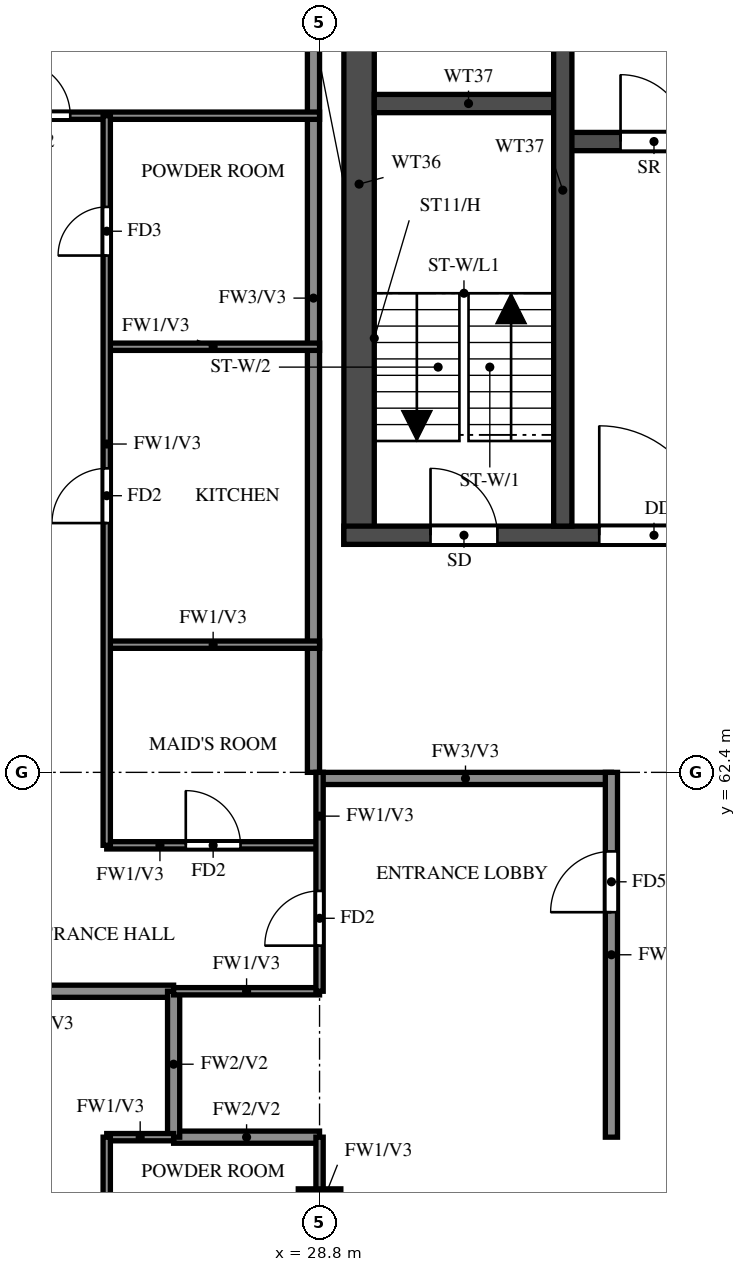
"""IFC4 building model, lengths in metres.
Left out: names, types, materials, properties, quantities, classifications, styles, units other than length and angle.
Written with IfcOpenShell. Run it as: python <this file> out.ifc"""

import sys

from ifc_helpers import new_model, si_unit, direction, frame, frame_2d, origin, origin_2d, place, context, subcontext, project, spatial, rectangle, extrude, source, transform, mapped, element, fill, save


model = new_model("IFC4")
c1 = context("Model", 3, precision=1e-05, world=origin(), true_north=direction((0.0, 1.0)))
c2 = subcontext(c1, "Body", "Model", "MODEL_VIEW")
j1 = project(units=[si_unit("LENGTHUNIT", "METRE"), si_unit("PLANEANGLEUNIT", "RADIAN")], contexts=[c1])
p1 = place(None, origin())
s1 = spatial("IfcSite", under=j1, at=p1, CompositionType="ELEMENT")
p2 = place(p1, origin())
s2 = spatial("IfcBuilding", under=s1, at=p2, CompositionType="ELEMENT")
p3 = place(p2, frame((0.0, 0.0, 260.5)))
s3 = spatial("IfcBuildingStorey", under=s2, at=p3, CompositionType="ELEMENT", Elevation=260.5)
m1 = source(origin(), c2, "Body", "SweptSolid", [
    extrude(rectangle(XDim=0.7, YDim=0.7, at=origin_2d()), origin(), (0.0, 0.0, 1.0), 3.22),
])
p4 = place(p3, frame((28.8, 55.2, 0.0), z_axis=(0.0, 0.0, 1.0), x_axis=(1.0, 0.0, 0.0)))
e1 = element("IfcColumn", 1, at=p4, inside=s3, PredefinedType="COLUMN", context=c2, shape_type="MappedRepresentation", body=[
    mapped(m1, transform((0.0, 0.0, 0.0))),
])
p5 = place(p3, frame((29.45, 66.15, 0.0), z_axis=(0.0, 0.0, 1.0), x_axis=(0.0, 1.0, 0.0)))
e2 = element("IfcWall", 2, at=p5, inside=s3, PredefinedType="SHEAR", context=c2, shape_type="SweptSolid", body=[
    extrude(rectangle(XDim=11.85, YDim=0.5, at=frame_2d((5.925, 0.0))), origin(), (0.0, 0.0, 1.0), 3.22),
])
p6 = place(p3, frame((29.2, 66.3, 0.0), z_axis=(0.0, 0.0, 1.0), x_axis=(1.0, 0.0, 0.0)))
e3 = element("IfcWall", 3, at=p6, inside=s3, PredefinedType="SHEAR", context=c2, shape_type="SweptSolid", body=[
    extrude(rectangle(XDim=42.4, YDim=0.3, at=frame_2d((21.2, 0.0))), origin(), (0.0, 0.0, 1.0), 3.22),
])
p7 = place(p6, frame((1.425, 0.0, 0.0)))
e4 = element("IfcOpeningElement", 4, at=p7, cuts=e3, PredefinedType="OPENING", context=c2, shape_type="SweptSolid", body=[
    extrude(rectangle(XDim=1.1, YDim=2.1, at=frame_2d((0.55, 1.05))), frame((0.0, 0.16, 0.0), z_axis=(0.0, -1.0, 0.0), x_axis=(1.0, 0.0, 0.0)), (0.0, 0.0, 1.0), 0.32),
])
p8 = place(p6, frame((4.2, 0.0, 0.0)))
e5 = element("IfcOpeningElement", 5, at=p8, cuts=e3, PredefinedType="OPENING", context=c2, shape_type="SweptSolid", body=[
    extrude(rectangle(XDim=1.8, YDim=2.1, at=frame_2d((0.9, 1.05))), frame((0.0, 0.16, 0.0), z_axis=(0.0, -1.0, 0.0), x_axis=(1.0, 0.0, 0.0)), (0.0, 0.0, 1.0), 0.32),
])
p9 = place(p3, frame((32.8, 72.775, 0.0), z_axis=(0.0, 0.0, 1.0), x_axis=(1.0, 0.0, 0.0)))
e6 = element("IfcWall", 6, at=p9, inside=s3, PredefinedType="SHEAR", context=c2, shape_type="SweptSolid", body=[
    extrude(rectangle(XDim=35.2, YDim=0.3, at=frame_2d((17.6, 0.0))), origin(), (0.0, 0.0, 1.0), 3.22),
])
p10 = place(p9, frame((19.8, 0.0, 0.0)))
e7 = element("IfcOpeningElement", 7, at=p10, cuts=e6, PredefinedType="OPENING", context=c2, shape_type="SweptSolid", body=[
    extrude(rectangle(XDim=1.1, YDim=2.1, at=frame_2d((0.55, 1.05))), frame((0.0, 0.16, 0.0), z_axis=(0.0, -1.0, 0.0), x_axis=(1.0, 0.0, 0.0)), (0.0, 0.0, 1.0), 0.32),
])
p11 = place(p9, frame((27.725, 0.0, 0.0)))
e8 = element("IfcOpeningElement", 8, at=p11, cuts=e6, PredefinedType="OPENING", context=c2, shape_type="SweptSolid", body=[
    extrude(rectangle(XDim=1.1, YDim=2.1, at=frame_2d((0.55, 1.05))), frame((0.0, 0.16, 0.0), z_axis=(0.0, -1.0, 0.0), x_axis=(1.0, 0.0, 0.0)), (0.0, 0.0, 1.0), 0.32),
])
p12 = place(p9, frame((30.325, 0.0, 0.0)))
e9 = element("IfcOpeningElement", 9, at=p12, cuts=e6, PredefinedType="OPENING", context=c2, shape_type="SweptSolid", body=[
    extrude(rectangle(XDim=1.1, YDim=2.1, at=frame_2d((0.55, 1.05))), frame((0.0, 0.16, 0.0), z_axis=(0.0, -1.0, 0.0), x_axis=(1.0, 0.0, 0.0)), (0.0, 0.0, 1.0), 0.32),
])
p13 = place(p9, frame((3.825, 0.0, 0.0)))
e10 = element("IfcOpeningElement", 10, at=p13, cuts=e6, PredefinedType="OPENING", context=c2, shape_type="SweptSolid", body=[
    extrude(rectangle(XDim=1.1, YDim=2.1, at=frame_2d((0.55, 1.05))), frame((0.0, 0.16, 0.0), z_axis=(0.0, -1.0, 0.0), x_axis=(1.0, 0.0, 0.0)), (0.0, 0.0, 1.0), 0.32),
])
p14 = place(p9, frame((6.575, 0.0, 0.0)))
e11 = element("IfcOpeningElement", 11, at=p14, cuts=e6, PredefinedType="OPENING", context=c2, shape_type="SweptSolid", body=[
    extrude(rectangle(XDim=1.1, YDim=2.1, at=frame_2d((0.55, 1.05))), frame((0.0, 0.16, 0.0), z_axis=(0.0, -1.0, 0.0), x_axis=(1.0, 0.0, 0.0)), (0.0, 0.0, 1.0), 0.32),
])
p15 = place(p9, frame((9.325, 0.0, 0.0)))
e12 = element("IfcOpeningElement", 12, at=p15, cuts=e6, PredefinedType="OPENING", context=c2, shape_type="SweptSolid", body=[
    extrude(rectangle(XDim=1.1, YDim=2.1, at=frame_2d((0.55, 1.05))), frame((0.0, 0.16, 0.0), z_axis=(0.0, -1.0, 0.0), x_axis=(1.0, 0.0, 0.0)), (0.0, 0.0, 1.0), 0.32),
])
p16 = place(p9, frame((12.075, 0.0, 0.0)))
e13 = element("IfcOpeningElement", 13, at=p16, cuts=e6, PredefinedType="OPENING", context=c2, shape_type="SweptSolid", body=[
    extrude(rectangle(XDim=1.1, YDim=2.1, at=frame_2d((0.55, 1.05))), frame((0.0, 0.16, 0.0), z_axis=(0.0, -1.0, 0.0), x_axis=(1.0, 0.0, 0.0)), (0.0, 0.0, 1.0), 0.32),
])
p17 = place(p9, frame((14.825, 0.0, 0.0)))
e14 = element("IfcOpeningElement", 14, at=p17, cuts=e6, PredefinedType="OPENING", context=c2, shape_type="SweptSolid", body=[
    extrude(rectangle(XDim=1.1, YDim=2.1, at=frame_2d((0.55, 1.05))), frame((0.0, 0.16, 0.0), z_axis=(0.0, -1.0, 0.0), x_axis=(1.0, 0.0, 0.0)), (0.0, 0.0, 1.0), 0.32),
])
p18 = place(p9, frame((17.575, 0.0, 0.0)))
e15 = element("IfcOpeningElement", 15, at=p18, cuts=e6, PredefinedType="OPENING", context=c2, shape_type="SweptSolid", body=[
    extrude(rectangle(XDim=1.1, YDim=2.1, at=frame_2d((0.55, 1.05))), frame((0.0, 0.16, 0.0), z_axis=(0.0, -1.0, 0.0), x_axis=(1.0, 0.0, 0.0)), (0.0, 0.0, 1.0), 0.32),
])
p19 = place(p9, frame((0.95, 0.0, 0.0)))
e16 = element("IfcOpeningElement", 16, at=p19, cuts=e6, PredefinedType="OPENING", context=c2, shape_type="SweptSolid", body=[
    extrude(rectangle(XDim=1.1, YDim=2.1, at=frame_2d((0.55, 1.05))), frame((0.0, 0.16, 0.0), z_axis=(0.0, -1.0, 0.0), x_axis=(1.0, 0.0, 0.0)), (0.0, 0.0, 1.0), 0.32),
])
p20 = place(p3, frame((29.7, 73.4, 0.0), z_axis=(0.0, 0.0, 1.0), x_axis=(1.0, 0.0, 0.0)))
e17 = element("IfcWall", 17, at=p20, inside=s3, PredefinedType="SHEAR", context=c2, shape_type="SweptSolid", body=[
    extrude(rectangle(XDim=3.1, YDim=0.3, at=frame_2d((1.55, 0.0))), origin(), (0.0, 0.0, 1.0), 3.22),
])
p21 = place(p3, frame((32.8, 66.45, 0.0), z_axis=(0.0, 0.0, 1.0), x_axis=(0.0, 1.0, 0.0)))
e18 = element("IfcWall", 18, at=p21, inside=s3, PredefinedType="SHEAR", context=c2, shape_type="SweptSolid", body=[
    extrude(rectangle(XDim=11.05, YDim=0.3, at=frame_2d((5.525, 0.0))), origin(), (0.0, 0.0, 1.0), 3.22),
])
p22 = place(p3, frame((28.8, 62.3, 0.0), z_axis=(0.0, 0.0, 1.0), x_axis=(1.0, 0.0, 0.0)))
e19 = element("IfcWall", 19, at=p22, inside=s3, PredefinedType="SOLIDWALL", context=c2, shape_type="SweptSolid", body=[
    extrude(rectangle(XDim=4.8, YDim=0.2, at=frame_2d((2.4, 0.0))), origin(), (0.0, 0.0, 1.0), 3.22),
])
p23 = place(p3, frame((28.7, 62.4, 0.0), z_axis=(0.0, 0.0, 1.0), x_axis=(0.0, 1.0, 0.0)))
e20 = element("IfcWall", 20, at=p23, inside=s3, PredefinedType="SOLIDWALL", context=c2, shape_type="SweptSolid", body=[
    extrude(rectangle(XDim=15.6, YDim=0.2, at=frame_2d((7.8, 0.0))), origin(), (0.0, 0.0, 1.0), 3.22),
])
p24 = place(p3, frame((33.6, 56.4, 0.0), z_axis=(0.0, 0.0, 1.0), x_axis=(0.0, 1.0, 0.0)))
e21 = element("IfcWall", 21, at=p24, inside=s3, PredefinedType="SOLIDWALL", context=c2, shape_type="SweptSolid", body=[
    extrude(rectangle(XDim=6.0, YDim=0.2, at=frame_2d((3.0, 0.0))), origin(), (0.0, 0.0, 1.0), 3.22),
])
p25 = place(p24, frame((3.7, 0.0, 0.0)))
e22 = element("IfcOpeningElement", 22, at=p25, cuts=e21, PredefinedType="OPENING", context=c2, shape_type="SweptSolid", body=[
    extrude(rectangle(XDim=1.0, YDim=2.1, at=frame_2d((0.5, 1.05))), frame((0.0, 0.11, 0.0), z_axis=(0.0, -1.0, 0.0), x_axis=(1.0, 0.0, 0.0)), (0.0, 0.0, 1.0), 0.22),
])
p26 = place(p3, frame((26.4, 56.4, 0.0), z_axis=(0.0, 0.0, 1.0), x_axis=(1.0, 0.0, 0.0)))
e23 = element("IfcWall", 23, at=p26, inside=s3, PredefinedType="SOLIDWALL", context=c2, shape_type="SweptSolid", body=[
    extrude(rectangle(XDim=2.4, YDim=0.2, at=frame_2d((1.2, 0.0))), origin(), (0.0, 0.0, 1.0), 3.22),
])
p27 = place(p3, frame((18.525, 58.8, 0.0), z_axis=(0.0, 0.0, 1.0), x_axis=(1.0, 0.0, 0.0)))
e24 = element("IfcWall", 24, at=p27, inside=s3, PredefinedType="SOLIDWALL", context=c2, shape_type="SweptSolid", body=[
    extrude(rectangle(XDim=7.875, YDim=0.2, at=frame_2d((3.938, 0.0))), origin(), (0.0, 0.0, 1.0), 2.32),
])
p28 = place(p3, frame((26.4, 56.4, 0.0), z_axis=(0.0, 0.0, 1.0), x_axis=(0.0, 1.0, 0.0)))
e25 = element("IfcWall", 25, at=p28, inside=s3, PredefinedType="SOLIDWALL", context=c2, shape_type="SweptSolid", body=[
    extrude(rectangle(XDim=2.4, YDim=0.2, at=frame_2d((1.2, 0.0))), origin(), (0.0, 0.0, 1.0), 3.22),
])
p29 = place(p3, frame((25.3, 56.4, 0.0), z_axis=(0.0, 0.0, 1.0), x_axis=(1.0, 0.0, 0.0)))
e26 = element("IfcWall", 26, at=p29, inside=s3, PredefinedType="PARTITIONING", context=c2, shape_type="SweptSolid", body=[
    extrude(rectangle(XDim=1.1, YDim=0.12, at=frame_2d((0.55, 0.0))), origin(), (0.0, 0.0, 1.0), 3.22),
])
p30 = place(p3, frame((26.4, 58.8, 0.0), z_axis=(0.0, 0.0, 1.0), x_axis=(1.0, 0.0, 0.0)))
e27 = element("IfcWall", 27, at=p30, inside=s3, PredefinedType="PARTITIONING", context=c2, shape_type="SweptSolid", body=[
    extrude(rectangle(XDim=2.4, YDim=0.12, at=frame_2d((1.2, 0.0))), origin(), (0.0, 0.0, 1.0), 3.22),
])
p31 = place(p3, frame((25.3, 61.2, 0.0), z_axis=(0.0, 0.0, 1.0), x_axis=(1.0, 0.0, 0.0)))
e28 = element("IfcWall", 28, at=p31, inside=s3, PredefinedType="PARTITIONING", context=c2, shape_type="SweptSolid", body=[
    extrude(rectangle(XDim=3.5, YDim=0.12, at=frame_2d((1.75, 0.0))), origin(), (0.0, 0.0, 1.0), 3.22),
])
p32 = place(p31, frame((1.3, 0.0, 0.0)))
e29 = element("IfcOpeningElement", 29, at=p32, cuts=e28, PredefinedType="OPENING", context=c2, shape_type="SweptSolid", body=[
    extrude(rectangle(XDim=0.9, YDim=2.1, at=frame_2d((0.45, 1.05))), frame((0.0, 0.07, 0.0), z_axis=(0.0, -1.0, 0.0), x_axis=(1.0, 0.0, 0.0)), (0.0, 0.0, 1.0), 0.14),
])
for number, where, z_axis, x_axis in (
    (30, (25.3, 64.5, 0.0), (0.0, 0.0, 1.0), (1.0, 0.0, 0.0)),
    (31, (25.3, 69.4, 0.0), (0.0, 0.0, 1.0), (1.0, 0.0, 0.0)),
):
    element("IfcWall", number, at=place(p3, frame(where, z_axis=z_axis, x_axis=x_axis)), inside=s3, PredefinedType="PARTITIONING", context=c2, shape_type="SweptSolid", body=[
        extrude(rectangle(XDim=3.5, YDim=0.12, at=frame_2d((1.75, 0.0))), origin(), (0.0, 0.0, 1.0), 3.22),
    ])
p33 = place(p3, frame((18.525, 73.2, 0.0), z_axis=(0.0, 0.0, 1.0), x_axis=(1.0, 0.0, 0.0)))
e32 = element("IfcWall", 32, at=p33, inside=s3, PredefinedType="PARTITIONING", context=c2, shape_type="SweptSolid", body=[
    extrude(rectangle(XDim=10.275, YDim=0.12, at=frame_2d((5.138, 0.0))), origin(), (0.0, 0.0, 1.0), 2.32),
])
p34 = place(p33, frame((5.275, 0.0, 0.0)))
e33 = element("IfcOpeningElement", 33, at=p34, cuts=e32, PredefinedType="OPENING", context=c2, shape_type="SweptSolid", body=[
    extrude(rectangle(XDim=0.9, YDim=2.1, at=frame_2d((0.45, 1.05))), frame((0.0, 0.07, 0.0), z_axis=(0.0, -1.0, 0.0), x_axis=(1.0, 0.0, 0.0)), (0.0, 0.0, 1.0), 0.14),
])
p35 = place(p3, frame((25.3, 54.0, 0.0), z_axis=(0.0, 0.0, 1.0), x_axis=(0.0, 1.0, 0.0)))
e34 = element("IfcWall", 34, at=p35, inside=s3, PredefinedType="PARTITIONING", context=c2, shape_type="SweptSolid", body=[
    extrude(rectangle(XDim=2.4, YDim=0.12, at=frame_2d((1.2, 0.0))), origin(), (0.0, 0.0, 1.0), 3.22),
])
p36 = place(p3, frame((25.3, 61.2, 0.0), z_axis=(0.0, 0.0, 1.0), x_axis=(0.0, 1.0, 0.0)))
e35 = element("IfcWall", 35, at=p36, inside=s3, PredefinedType="PARTITIONING", context=c2, shape_type="SweptSolid", body=[
    extrude(rectangle(XDim=12.0, YDim=0.12, at=frame_2d((6.0, 0.0))), origin(), (0.0, 0.0, 1.0), 3.22),
])
p37 = place(p36, frame((5.3, 0.0, 0.0)))
e36 = element("IfcOpeningElement", 36, at=p37, cuts=e35, PredefinedType="OPENING", context=c2, shape_type="SweptSolid", body=[
    extrude(rectangle(XDim=0.9, YDim=2.1, at=frame_2d((0.45, 1.05))), frame((0.0, 0.07, 0.0), z_axis=(0.0, -1.0, 0.0), x_axis=(1.0, 0.0, 0.0)), (0.0, 0.0, 1.0), 0.14),
])
p38 = place(p36, frame((9.7, 0.0, 0.0)))
e37 = element("IfcOpeningElement", 37, at=p38, cuts=e35, PredefinedType="OPENING", context=c2, shape_type="SweptSolid", body=[
    extrude(rectangle(XDim=0.8, YDim=2.1, at=frame_2d((0.4, 1.05))), frame((0.0, 0.07, 0.0), z_axis=(0.0, -1.0, 0.0), x_axis=(1.0, 0.0, 0.0)), (0.0, 0.0, 1.0), 0.14),
])
p39 = place(p3, frame((28.8, 54.0, 0.0), z_axis=(0.0, 0.0, 1.0), x_axis=(0.0, 1.0, 0.0)))
e38 = element("IfcWall", 38, at=p39, inside=s3, PredefinedType="PARTITIONING", context=c2, shape_type="SweptSolid", body=[
    extrude(rectangle(XDim=2.4, YDim=0.12, at=frame_2d((1.2, 0.0))), origin(), (0.0, 0.0, 1.0), 3.22),
])
p40 = place(p3, frame((28.8, 58.8, 0.0), z_axis=(0.0, 0.0, 1.0), x_axis=(0.0, 1.0, 0.0)))
e39 = element("IfcWall", 39, at=p40, inside=s3, PredefinedType="PARTITIONING", context=c2, shape_type="SweptSolid", body=[
    extrude(rectangle(XDim=3.6, YDim=0.12, at=frame_2d((1.8, 0.0))), origin(), (0.0, 0.0, 1.0), 3.22),
])
p41 = place(p40, frame((0.75, 0.0, 0.0)))
e40 = element("IfcOpeningElement", 40, at=p41, cuts=e39, PredefinedType="OPENING", context=c2, shape_type="SweptSolid", body=[
    extrude(rectangle(XDim=0.9, YDim=2.1, at=frame_2d((0.45, 1.05))), frame((0.0, 0.07, 0.0), z_axis=(0.0, -1.0, 0.0), x_axis=(1.0, 0.0, 0.0)), (0.0, 0.0, 1.0), 0.14),
])
p42 = place(p7, origin())
e41 = element("IfcDoor", 41, at=p42, inside=s3, OperationType="SINGLE_SWING_LEFT", PredefinedType="DOOR", context=c2, shape_type="SweptSolid", body=[
    extrude(rectangle(XDim=1.1, YDim=2.1, at=frame_2d((0.55, 1.05))), frame((0.0, 0.025, 0.0), z_axis=(0.0, -1.0, 0.0), x_axis=(1.0, 0.0, 0.0)), (0.0, 0.0, 1.0), 0.05),
])
fill(e4, e41)
p43 = place(p8, origin())
e42 = element("IfcDoor", 42, at=p43, inside=s3, OperationType="DOUBLE_DOOR_SINGLE_SWING", PredefinedType="DOOR", context=c2, shape_type="SweptSolid", body=[
    extrude(rectangle(XDim=1.8, YDim=2.1, at=frame_2d((0.9, 1.05))), frame((0.0, 0.025, 0.0), z_axis=(0.0, -1.0, 0.0), x_axis=(1.0, 0.0, 0.0)), (0.0, 0.0, 1.0), 0.05),
])
fill(e5, e42)
p44 = place(p19, origin())
e43 = element("IfcDoor", 43, at=p44, inside=s3, OperationType="SINGLE_SWING_LEFT", PredefinedType="DOOR", context=c2, shape_type="SweptSolid", body=[
    extrude(rectangle(XDim=1.1, YDim=2.1, at=frame_2d((0.55, 1.05))), frame((0.0, 0.025, 0.0), z_axis=(0.0, -1.0, 0.0), x_axis=(1.0, 0.0, 0.0)), (0.0, 0.0, 1.0), 0.05),
])
fill(e16, e43)
p45 = place(p41, origin())
e44 = element("IfcDoor", 44, at=p45, inside=s3, OperationType="SINGLE_SWING_LEFT", PredefinedType="DOOR", context=c2, shape_type="SweptSolid", body=[
    extrude(rectangle(XDim=0.9, YDim=2.1, at=frame_2d((0.45, 1.05))), frame((0.0, 0.025, 0.0), z_axis=(0.0, -1.0, 0.0), x_axis=(1.0, 0.0, 0.0)), (0.0, 0.0, 1.0), 0.05),
])
fill(e40, e44)
p46 = place(p25, origin())
e45 = element("IfcDoor", 45, at=p46, inside=s3, OperationType="SINGLE_SWING_RIGHT", PredefinedType="DOOR", context=c2, shape_type="SweptSolid", body=[
    extrude(rectangle(XDim=1.0, YDim=2.1, at=frame_2d((0.5, 1.05))), frame((0.0, 0.025, 0.0), z_axis=(0.0, -1.0, 0.0), x_axis=(1.0, 0.0, 0.0)), (0.0, 0.0, 1.0), 0.05),
])
fill(e22, e45)
p47 = place(p34, origin())
e46 = element("IfcDoor", 46, at=p47, inside=s3, OperationType="SINGLE_SWING_LEFT", PredefinedType="DOOR", context=c2, shape_type="SweptSolid", body=[
    extrude(rectangle(XDim=0.9, YDim=2.1, at=frame_2d((0.45, 1.05))), frame((0.0, 0.025, 0.0), z_axis=(0.0, -1.0, 0.0), x_axis=(1.0, 0.0, 0.0)), (0.0, 0.0, 1.0), 0.05),
])
fill(e33, e46)
p48 = place(p32, origin())
e47 = element("IfcDoor", 47, at=p48, inside=s3, OperationType="SINGLE_SWING_LEFT", PredefinedType="DOOR", context=c2, shape_type="SweptSolid", body=[
    extrude(rectangle(XDim=0.9, YDim=2.1, at=frame_2d((0.45, 1.05))), frame((0.0, 0.025, 0.0), z_axis=(0.0, -1.0, 0.0), x_axis=(1.0, 0.0, 0.0)), (0.0, 0.0, 1.0), 0.05),
])
fill(e29, e47)
p49 = place(p37, origin())
e48 = element("IfcDoor", 48, at=p49, inside=s3, OperationType="SINGLE_SWING_RIGHT", PredefinedType="DOOR", context=c2, shape_type="SweptSolid", body=[
    extrude(rectangle(XDim=0.9, YDim=2.1, at=frame_2d((0.45, 1.05))), frame((0.0, 0.025, 0.0), z_axis=(0.0, -1.0, 0.0), x_axis=(1.0, 0.0, 0.0)), (0.0, 0.0, 1.0), 0.05),
])
fill(e36, e48)
p50 = place(p38, origin())
e49 = element("IfcDoor", 49, at=p50, inside=s3, OperationType="SINGLE_SWING_LEFT", PredefinedType="DOOR", context=c2, shape_type="SweptSolid", body=[
    extrude(rectangle(XDim=0.8, YDim=2.1, at=frame_2d((0.4, 1.05))), frame((0.0, 0.025, 0.0), z_axis=(0.0, -1.0, 0.0), x_axis=(1.0, 0.0, 0.0)), (0.0, 0.0, 1.0), 0.05),
])
fill(e37, e49)
save(model, sys.argv[1])
